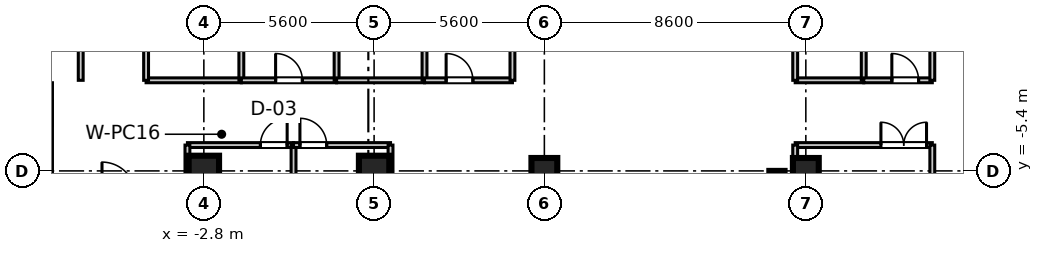
"""IFC4 building model, lengths in metres.
Left out: names, types, materials, properties, quantities, classifications, styles, units other than length and angle.
Written with IfcOpenShell. Run it as: python <this file> out.ifc"""

import sys

from ifc_helpers import new_model, si_unit, direction, frame, frame_2d, origin, origin_2d, place, context, subcontext, project, spatial, rectangle, extrude, source, transform, mapped, element, fill, save


model = new_model("IFC4")
c1 = context("Model", 3, precision=1e-05, world=origin(), true_north=direction((0.0, 1.0)))
c2 = subcontext(c1, "Body", "Model", "MODEL_VIEW")
j1 = project(units=[si_unit("LENGTHUNIT", "METRE"), si_unit("PLANEANGLEUNIT", "RADIAN")], contexts=[c1])
p1 = place(None, origin())
s1 = spatial("IfcSite", under=j1, at=p1, CompositionType="ELEMENT")
p2 = place(p1, origin())
s2 = spatial("IfcBuilding", under=s1, at=p2, CompositionType="ELEMENT")
p3 = place(p2, frame((0.0, 0.0, 227.1)))
s3 = spatial("IfcBuildingStorey", under=s2, at=p3, CompositionType="ELEMENT", Elevation=227.1)
m1 = source(origin(), c2, "Body", "SweptSolid", [
    extrude(rectangle(XDim=1.0, YDim=1.0, at=origin_2d()), origin(), (0.0, 0.0, 1.0), 3.655),
])
for number, where, z_axis, x_axis in (
    (1, (-2.8, -5.4, 0.0), (0.0, 0.0, 1.0), (1.0, 0.0, 0.0)),
    (2, (2.8, -5.4, 0.0), (0.0, 0.0, 1.0), (1.0, 0.0, 0.0)),
):
    element("IfcColumn", number, at=place(p3, frame(where, z_axis=z_axis, x_axis=x_axis)), inside=s3, PredefinedType="COLUMN", context=c2, shape_type="MappedRepresentation", body=[
        mapped(m1, transform((0.0, 0.0, 0.0), scale=1.0)),
    ])
m2 = source(origin(), c2, "Body", "SweptSolid", [
    extrude(rectangle(XDim=0.85, YDim=0.85, at=origin_2d()), origin(), (0.0, 0.0, 1.0), 3.655),
])
for number, where, z_axis, x_axis in (
    (3, (8.4, -5.4, 0.0), (0.0, 0.0, 1.0), (1.0, 0.0, 0.0)),
    (4, (17.0, -5.4, 0.0), (0.0, 0.0, 1.0), (1.0, 0.0, 0.0)),
):
    element("IfcColumn", number, at=place(p3, frame(where, z_axis=z_axis, x_axis=x_axis)), inside=s3, PredefinedType="PILASTER", context=c2, shape_type="MappedRepresentation", body=[
        mapped(m2, transform((0.0, 0.0, 0.0), scale=1.0)),
    ])
m3 = source(origin(), c2, "Body", "SweptSolid", [
    extrude(rectangle(XDim=11.6, YDim=0.5, at=frame_2d((5.8, 0.0))), origin(), (0.0, 0.0, 1.0), 3.41),
])
p4 = place(p3, frame((16.05, -17.0, 0.0), z_axis=(0.0, 0.0, 1.0), x_axis=(0.0, 1.0, 0.0)))
e5 = element("IfcWall", 5, at=p4, inside=s3, PredefinedType="SHEAR", context=c2, shape_type="MappedRepresentation", body=[
    mapped(m3, transform((0.0, 0.0, 0.0), scale=1.0)),
])
m4 = source(origin(), c2, "Body", "SweptSolid", [
    extrude(rectangle(XDim=4.51, YDim=0.16, at=frame_2d((2.255, 0.0))), origin(), (0.0, 0.0, 1.0), 2.75),
])
p5 = place(p3, frame((16.65, -4.55, 0.0), z_axis=(0.0, 0.0, 1.0), x_axis=(1.0, 0.0, 0.0)))
e6 = element("IfcWall", 6, at=p5, inside=s3, PredefinedType="PARTITIONING", context=c2, shape_type="MappedRepresentation", body=[
    mapped(m4, transform((0.0, 0.0, 0.0), scale=1.0)),
])
p6 = place(p5, frame((2.82, 0.0, 0.0)))
e7 = element("IfcOpeningElement", 7, at=p6, cuts=e6, PredefinedType="OPENING", context=c2, shape_type="SweptSolid", body=[
    extrude(rectangle(XDim=1.5, YDim=2.15, at=frame_2d((0.75, 1.075))), frame((0.0, 0.09, 0.0), z_axis=(0.0, -1.0, 0.0), x_axis=(1.0, 0.0, 0.0)), (0.0, 0.0, 1.0), 0.18),
])
m5 = source(origin(), c2, "Body", "SweptSolid", [
    extrude(rectangle(XDim=19.35, YDim=0.16, at=frame_2d((9.675, 0.0))), origin(), (0.0, 0.0, 1.0), 2.75),
])
p7 = place(p3, frame((16.65, -23.9, 0.0), z_axis=(0.0, 0.0, 1.0), x_axis=(0.0, 1.0, 0.0)))
e8 = element("IfcWall", 8, at=p7, inside=s3, PredefinedType="PARTITIONING", context=c2, shape_type="MappedRepresentation", body=[
    mapped(m5, transform((0.0, 0.0, 0.0), scale=1.0)),
])
m6 = source(origin(), c2, "Body", "SweptSolid", [
    extrude(rectangle(XDim=17.93, YDim=0.16, at=frame_2d((8.965, 0.0))), origin(), (0.0, 0.0, 1.0), 2.75),
])
p8 = place(p3, frame((21.16, -22.48, 0.0), z_axis=(0.0, 0.0, 1.0), x_axis=(0.0, 1.0, 0.0)))
e9 = element("IfcWall", 9, at=p8, inside=s3, PredefinedType="PARTITIONING", context=c2, shape_type="MappedRepresentation", body=[
    mapped(m6, transform((0.0, 0.0, 0.0), scale=1.0)),
])
m7 = source(origin(), c2, "Body", "SweptSolid", [
    extrude(rectangle(XDim=10.7, YDim=0.16, at=frame_2d((5.35, 0.0))), origin(), (0.0, 0.0, 1.0), 2.75),
])
p9 = place(p3, frame((-7.86, -13.2, 0.0), z_axis=(0.0, 0.0, 1.0), x_axis=(0.0, 1.0, 0.0)))
e10 = element("IfcWall", 10, at=p9, inside=s3, PredefinedType="PARTITIONING", context=c2, shape_type="MappedRepresentation", body=[
    mapped(m7, transform((0.0, 0.0, 0.0), scale=1.0)),
])
p10 = place(p9, frame((9.26, 0.0, 0.0)))
e11 = element("IfcOpeningElement", 11, at=p10, cuts=e10, PredefinedType="OPENING", context=c2, shape_type="SweptSolid", body=[
    extrude(rectangle(XDim=0.88, YDim=2.1, at=frame_2d((0.44, 1.05))), frame((0.0, 0.09, 0.0), z_axis=(0.0, -1.0, 0.0), x_axis=(1.0, 0.0, 0.0)), (0.0, 0.0, 1.0), 0.18),
])
m8 = source(origin(), c2, "Body", "SweptSolid", [
    extrude(rectangle(XDim=3.49, YDim=0.16, at=frame_2d((1.745, 0.0))), origin(), (0.0, 0.0, 1.0), 2.75),
])
p11 = place(p3, frame((-3.34, -4.55, 0.0), z_axis=(0.0, 0.0, 1.0), x_axis=(1.0, 0.0, 0.0)))
e12 = element("IfcWall", 12, at=p11, inside=s3, PredefinedType="PARTITIONING", context=c2, shape_type="MappedRepresentation", body=[
    mapped(m8, transform((0.0, 0.0, 0.0), scale=1.0)),
])
p12 = place(p11, frame((2.4, 0.0, 0.0)))
e13 = element("IfcOpeningElement", 13, at=p12, cuts=e12, PredefinedType="OPENING", context=c2, shape_type="SweptSolid", body=[
    extrude(rectangle(XDim=0.88, YDim=2.1, at=frame_2d((0.44, 1.05))), frame((0.0, 0.09, 0.0), z_axis=(0.0, -1.0, 0.0), x_axis=(1.0, 0.0, 0.0)), (0.0, 0.0, 1.0), 0.18),
])
for number, where, z_axis, x_axis in (
    (14, (-3.34, -23.9, 0.0), (0.0, 0.0, 1.0), (0.0, 1.0, 0.0)),
    (15, (0.15, -23.9, 0.0), (0.0, 0.0, 1.0), (0.0, 1.0, 0.0)),
):
    element("IfcWall", number, at=place(p3, frame(where, z_axis=z_axis, x_axis=x_axis)), inside=s3, PredefinedType="PARTITIONING", context=c2, shape_type="MappedRepresentation", body=[
        mapped(m5, transform((0.0, 0.0, 0.0), scale=1.0)),
    ])
m9 = source(origin(), c2, "Body", "SweptSolid", [
    extrude(rectangle(XDim=3.19, YDim=0.16, at=frame_2d((1.595, 0.0))), origin(), (0.0, 0.0, 1.0), 2.75),
])
p13 = place(p3, frame((0.15, -4.55, 0.0), z_axis=(0.0, 0.0, 1.0), x_axis=(1.0, 0.0, 0.0)))
e16 = element("IfcWall", 16, at=p13, inside=s3, PredefinedType="PARTITIONING", context=c2, shape_type="MappedRepresentation", body=[
    mapped(m9, transform((0.0, 0.0, 0.0), scale=1.0)),
])
p14 = place(p13, frame((0.21, 0.0, 0.0)))
e17 = element("IfcOpeningElement", 17, at=p14, cuts=e16, PredefinedType="OPENING", context=c2, shape_type="SweptSolid", body=[
    extrude(rectangle(XDim=0.88, YDim=2.1, at=frame_2d((0.44, 1.05))), frame((0.0, 0.09, 0.0), z_axis=(0.0, -1.0, 0.0), x_axis=(1.0, 0.0, 0.0)), (0.0, 0.0, 1.0), 0.18),
])
p15 = place(p3, frame((3.34, -23.9, 0.0), z_axis=(0.0, 0.0, 1.0), x_axis=(0.0, 1.0, 0.0)))
e18 = element("IfcWall", 18, at=p15, inside=s3, PredefinedType="PARTITIONING", context=c2, shape_type="MappedRepresentation", body=[
    mapped(m5, transform((0.0, 0.0, 0.0), scale=1.0)),
])
m10 = source(origin(), c2, "Body", "SweptSolid", [
    extrude(rectangle(XDim=4.84, YDim=0.16, at=frame_2d((2.42, 0.0))), origin(), (0.0, 0.0, 1.0), 2.75),
])
p16 = place(p3, frame((-6.85, -2.42, 0.0), z_axis=(0.0, 0.0, 1.0), x_axis=(0.0, 1.0, 0.0)))
e19 = element("IfcWall", 19, at=p16, inside=s3, PredefinedType="PARTITIONING", context=c2, shape_type="MappedRepresentation", body=[
    mapped(m10, transform((0.0, 0.0, 0.0), scale=1.0)),
])
p17 = place(p16, frame((1.945, 0.0, 0.0)))
e20 = element("IfcOpeningElement", 20, at=p17, cuts=e19, PredefinedType="OPENING", context=c2, shape_type="SweptSolid", body=[
    extrude(rectangle(XDim=0.95, YDim=2.1, at=frame_2d((0.475, 1.05))), frame((0.0, 0.09, 0.0), z_axis=(0.0, -1.0, 0.0), x_axis=(1.0, 0.0, 0.0)), (0.0, 0.0, 1.0), 0.18),
])
m11 = source(origin(), c2, "Body", "SweptSolid", [
    extrude(rectangle(XDim=3.133, YDim=0.16, at=frame_2d((1.566, 0.0))), origin(), (0.0, 0.0, 1.0), 2.75),
])
p18 = place(p3, frame((-4.7, -2.42, 0.0), z_axis=(0.0, 0.0, 1.0), x_axis=(1.0, 0.0, 0.0)))
e21 = element("IfcWall", 21, at=p18, inside=s3, PredefinedType="PARTITIONING", context=c2, shape_type="MappedRepresentation", body=[
    mapped(m11, transform((0.0, 0.0, 0.0), scale=1.0)),
])
for number, where, z_axis, x_axis in (
    (22, (-4.7, -2.42, 0.0), (0.0, 0.0, 1.0), (0.0, 1.0, 0.0)),
    (23, (-1.567, -2.42, 0.0), (0.0, 0.0, 1.0), (0.0, 1.0, 0.0)),
):
    element("IfcWall", number, at=place(p3, frame(where, z_axis=z_axis, x_axis=x_axis)), inside=s3, PredefinedType="PARTITIONING", context=c2, shape_type="MappedRepresentation", body=[
        mapped(m10, transform((0.0, 0.0, 0.0), scale=1.0)),
    ])
m12 = source(origin(), c2, "Body", "SweptSolid", [
    extrude(rectangle(XDim=3.133, YDim=0.16, at=frame_2d((1.566, 0.0))), origin(), (0.0, 0.0, 1.0), 2.75),
])
p19 = place(p3, frame((-1.567, -2.42, 0.0), z_axis=(0.0, 0.0, 1.0), x_axis=(1.0, 0.0, 0.0)))
e24 = element("IfcWall", 24, at=p19, inside=s3, PredefinedType="PARTITIONING", context=c2, shape_type="MappedRepresentation", body=[
    mapped(m12, transform((0.0, 0.0, 0.0), scale=1.0)),
])
p20 = place(p19, frame((1.127, 0.0, 0.0)))
e25 = element("IfcOpeningElement", 25, at=p20, cuts=e24, PredefinedType="OPENING", context=c2, shape_type="SweptSolid", body=[
    extrude(rectangle(XDim=0.88, YDim=2.1, at=frame_2d((0.44, 1.05))), frame((0.0, 0.09, 0.0), z_axis=(0.0, -1.0, 0.0), x_axis=(1.0, 0.0, 0.0)), (0.0, 0.0, 1.0), 0.18),
])
p21 = place(p3, frame((1.566, -2.42, 0.0), z_axis=(0.0, 0.0, 1.0), x_axis=(0.0, 1.0, 0.0)))
e26 = element("IfcWall", 26, at=p21, inside=s3, PredefinedType="PARTITIONING", context=c2, shape_type="MappedRepresentation", body=[
    mapped(m10, transform((0.0, 0.0, 0.0), scale=1.0)),
])
m13 = source(origin(), c2, "Body", "SweptSolid", [
    extrude(rectangle(XDim=2.892, YDim=0.16, at=frame_2d((1.446, 0.0))), origin(), (0.0, 0.0, 1.0), 2.75),
])
p22 = place(p3, frame((1.566, -2.42, 0.0), z_axis=(0.0, 0.0, 1.0), x_axis=(1.0, 0.0, 0.0)))
e27 = element("IfcWall", 27, at=p22, inside=s3, PredefinedType="PARTITIONING", context=c2, shape_type="MappedRepresentation", body=[
    mapped(m13, transform((0.0, 0.0, 0.0), scale=1.0)),
])
p23 = place(p3, frame((4.458, -2.42, 0.0), z_axis=(0.0, 0.0, 1.0), x_axis=(0.0, 1.0, 0.0)))
e28 = element("IfcWall", 28, at=p23, inside=s3, PredefinedType="PARTITIONING", context=c2, shape_type="MappedRepresentation", body=[
    mapped(m10, transform((0.0, 0.0, 0.0), scale=1.0)),
])
p24 = place(p3, frame((4.458, -2.42, 0.0), z_axis=(0.0, 0.0, 1.0), x_axis=(1.0, 0.0, 0.0)))
e29 = element("IfcWall", 29, at=p24, inside=s3, PredefinedType="PARTITIONING", context=c2, shape_type="MappedRepresentation", body=[
    mapped(m13, transform((0.0, 0.0, 0.0), scale=1.0)),
])
p25 = place(p24, frame((0.711, 0.0, 0.0)))
e30 = element("IfcOpeningElement", 30, at=p25, cuts=e29, PredefinedType="OPENING", context=c2, shape_type="SweptSolid", body=[
    extrude(rectangle(XDim=0.88, YDim=2.1, at=frame_2d((0.44, 1.05))), frame((0.0, 0.09, 0.0), z_axis=(0.0, -1.0, 0.0), x_axis=(1.0, 0.0, 0.0)), (0.0, 0.0, 1.0), 0.18),
])
p26 = place(p3, frame((7.35, -2.42, 0.0), z_axis=(0.0, 0.0, 1.0), x_axis=(0.0, 1.0, 0.0)))
e31 = element("IfcWall", 31, at=p26, inside=s3, PredefinedType="PARTITIONING", context=c2, shape_type="MappedRepresentation", body=[
    mapped(m10, transform((0.0, 0.0, 0.0), scale=1.0)),
])
m14 = source(origin(), c2, "Body", "SweptSolid", [
    extrude(rectangle(XDim=2.255, YDim=0.16, at=frame_2d((1.127, 0.0))), origin(), (0.0, 0.0, 1.0), 2.75),
])
p27 = place(p3, frame((16.65, -2.42, 0.0), z_axis=(0.0, 0.0, 1.0), x_axis=(1.0, 0.0, 0.0)))
e32 = element("IfcWall", 32, at=p27, inside=s3, PredefinedType="PARTITIONING", context=c2, shape_type="MappedRepresentation", body=[
    mapped(m14, transform((0.0, 0.0, 0.0), scale=1.0)),
])
for number, where, z_axis, x_axis in (
    (33, (16.65, -2.42, 0.0), (0.0, 0.0, 1.0), (0.0, 1.0, 0.0)),
    (34, (18.905, -2.42, 0.0), (0.0, 0.0, 1.0), (0.0, 1.0, 0.0)),
):
    element("IfcWall", number, at=place(p3, frame(where, z_axis=z_axis, x_axis=x_axis)), inside=s3, PredefinedType="PARTITIONING", context=c2, shape_type="MappedRepresentation", body=[
        mapped(m10, transform((0.0, 0.0, 0.0), scale=1.0)),
    ])
m15 = source(origin(), c2, "Body", "SweptSolid", [
    extrude(rectangle(XDim=2.255, YDim=0.16, at=frame_2d((1.127, 0.0))), origin(), (0.0, 0.0, 1.0), 2.75),
])
p28 = place(p3, frame((18.905, -2.42, 0.0), z_axis=(0.0, 0.0, 1.0), x_axis=(1.0, 0.0, 0.0)))
e35 = element("IfcWall", 35, at=p28, inside=s3, PredefinedType="PARTITIONING", context=c2, shape_type="MappedRepresentation", body=[
    mapped(m15, transform((0.0, 0.0, 0.0), scale=1.0)),
])
p29 = place(p28, frame((0.924, 0.0, 0.0)))
e36 = element("IfcOpeningElement", 36, at=p29, cuts=e35, PredefinedType="OPENING", context=c2, shape_type="SweptSolid", body=[
    extrude(rectangle(XDim=0.88, YDim=2.1, at=frame_2d((0.44, 1.05))), frame((0.0, 0.09, 0.0), z_axis=(0.0, -1.0, 0.0), x_axis=(1.0, 0.0, 0.0)), (0.0, 0.0, 1.0), 0.18),
])
p30 = place(p3, frame((21.16, -2.42, 0.0), z_axis=(0.0, 0.0, 1.0), x_axis=(0.0, 1.0, 0.0)))
e37 = element("IfcWall", 37, at=p30, inside=s3, PredefinedType="PARTITIONING", context=c2, shape_type="MappedRepresentation", body=[
    mapped(m10, transform((0.0, 0.0, 0.0), scale=1.0)),
])
m16 = source(origin(), c2, "Body", "SweptSolid", [
    extrude(rectangle(XDim=1.5, YDim=2.15, at=frame_2d((0.75, 1.075))), frame((0.0, 0.025, 0.0), z_axis=(0.0, -1.0, 0.0), x_axis=(1.0, 0.0, 0.0)), (0.0, 0.0, 1.0), 0.05),
])
p31 = place(p6, frame((1.5, 0.0, 0.0), z_axis=(0.0, 0.0, 1.0), x_axis=(-1.0, 0.0, 0.0)))
e38 = element("IfcDoor", 38, at=p31, inside=s3, OperationType="DOUBLE_DOOR_SINGLE_SWING", PredefinedType="DOOR", context=c2, shape_type="MappedRepresentation", body=[
    mapped(m16, transform((0.0, 0.0, 0.0), scale=1.0)),
])
fill(e7, e38)
m17 = source(origin(), c2, "Body", "SweptSolid", [
    extrude(rectangle(XDim=0.88, YDim=2.1, at=frame_2d((0.44, 1.05))), frame((0.0, 0.025, 0.0), z_axis=(0.0, -1.0, 0.0), x_axis=(1.0, 0.0, 0.0)), (0.0, 0.0, 1.0), 0.05),
])
p32 = place(p12, frame((0.88, 0.0, 0.0), z_axis=(0.0, 0.0, 1.0), x_axis=(-1.0, 0.0, 0.0)))
e39 = element("IfcDoor", 39, at=p32, inside=s3, OperationType="SINGLE_SWING_RIGHT", PredefinedType="DOOR", context=c2, shape_type="MappedRepresentation", body=[
    mapped(m17, transform((0.0, 0.0, 0.0), scale=1.0)),
])
fill(e13, e39)
p33 = place(p14, frame((0.88, 0.0, 0.0), z_axis=(0.0, 0.0, 1.0), x_axis=(-1.0, 0.0, 0.0)))
e40 = element("IfcDoor", 40, at=p33, inside=s3, OperationType="SINGLE_SWING_LEFT", PredefinedType="DOOR", context=c2, shape_type="MappedRepresentation", body=[
    mapped(m17, transform((0.0, 0.0, 0.0), scale=1.0)),
])
fill(e17, e40)
p34 = place(p20, origin())
e41 = element("IfcDoor", 41, at=p34, inside=s3, OperationType="SINGLE_SWING_LEFT", PredefinedType="DOOR", context=c2, shape_type="MappedRepresentation", body=[
    mapped(m17, transform((0.0, 0.0, 0.0), scale=1.0)),
])
fill(e25, e41)
p35 = place(p25, origin())
e42 = element("IfcDoor", 42, at=p35, inside=s3, OperationType="SINGLE_SWING_LEFT", PredefinedType="DOOR", context=c2, shape_type="MappedRepresentation", body=[
    mapped(m17, transform((0.0, 0.0, 0.0), scale=1.0)),
])
fill(e30, e42)
p36 = place(p29, origin())
e43 = element("IfcDoor", 43, at=p36, inside=s3, OperationType="SINGLE_SWING_LEFT", PredefinedType="DOOR", context=c2, shape_type="MappedRepresentation", body=[
    mapped(m17, transform((0.0, 0.0, 0.0), scale=1.0)),
])
fill(e36, e43)
save(model, sys.argv[1])
